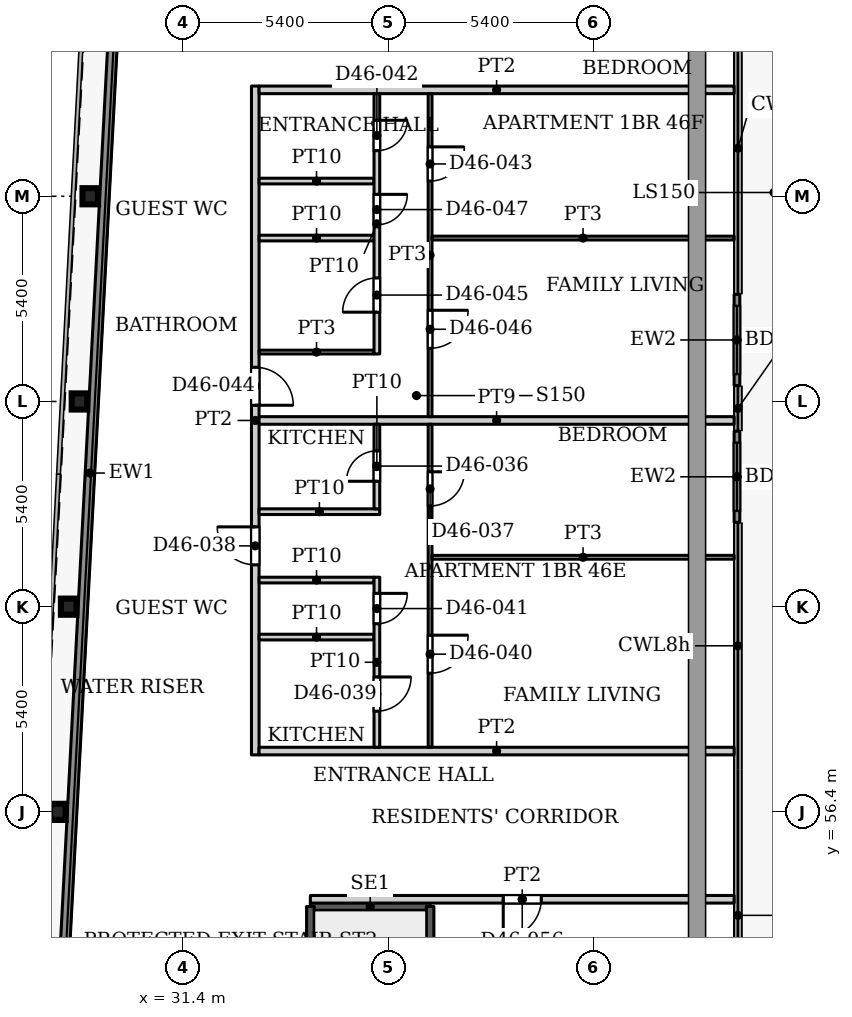
"""IFC4 building model, lengths in metres.
Left out: names, types, materials, properties, quantities, classifications, styles, units other than length and angle.
Written with IfcOpenShell. Run it as: python <this file> out.ifc"""

import sys

from ifc_helpers import new_model, si_unit, direction, frame, frame_2d, origin, origin_2d, place, context, subcontext, project, spatial, rectangle, i_section, extrude, source, transform, mapped, element, fill, save


model = new_model("IFC4")
c1 = context("Model", 3, precision=1e-05, world=origin(), true_north=direction((0.0, 1.0)))
c2 = subcontext(c1, "Body", "Model", "MODEL_VIEW")
j1 = project(units=[si_unit("LENGTHUNIT", "METRE"), si_unit("PLANEANGLEUNIT", "RADIAN")], contexts=[c1])
p1 = place(None, origin())
s1 = spatial("IfcSite", under=j1, at=p1, CompositionType="ELEMENT")
p2 = place(p1, origin())
s2 = spatial("IfcBuilding", under=s1, at=p2, CompositionType="ELEMENT")
p3 = place(p2, frame((0.0, 0.0, 195.5)))
s3 = spatial("IfcBuildingStorey", under=s2, at=p3, CompositionType="ELEMENT", Elevation=195.5)
for number, where, z_axis, x_axis in (
    (1, (28.106, 56.4, 0.0), (0.0, 0.0, 1.0), (1.0, 0.0, 0.0)),
    (2, (28.39, 61.8, 0.0), (0.0, 0.0, 1.0), (1.0, 0.0, 0.0)),
    (3, (28.674, 67.2, 0.0), (0.0, 0.0, 1.0), (1.0, 0.0, 0.0)),
    (4, (28.958, 72.6, 0.0), (0.0, 0.0, 1.0), (1.0, 0.0, 0.0)),
):
    element("IfcColumn", number, at=place(p3, frame(where, z_axis=z_axis, x_axis=x_axis)), inside=s3, PredefinedType="COLUMN", context=c2, shape_type="SweptSolid", body=[
        extrude(i_section(OverallWidth=0.409, OverallDepth=0.425, WebThickness=0.033, FlangeThickness=0.052, FilletRadius=0.013, at=origin_2d()), origin(), (0.0, 0.0, 1.0), 3.9),
    ])
p4 = place(p3, frame((27.195, 31.969, 0.0), z_axis=(0.0, 0.0, 1.0), x_axis=(0.052554995867, 0.998618031286, 0.0)))
e5 = element("IfcWall", 5, at=p4, inside=s3, PredefinedType="SOLIDWALL", context=c2, shape_type="SweptSolid", body=[
    extrude(rectangle(XDim=66.787, YDim=0.25, at=frame_2d((33.394, 0.0))), origin(), (0.0, 0.0, 1.0), 3.75),
])
p5 = place(p3, frame((45.975, 70.018, 0.0), z_axis=(0.0, 0.0, 1.0), x_axis=(0.0, -1.0, 0.0)))
e6 = element("IfcWall", 6, at=p5, inside=s3, PredefinedType="SOLIDWALL", context=c2, shape_type="SweptSolid", body=[
    extrude(rectangle(XDim=2.4, YDim=0.15, at=frame_2d((1.2, 0.0))), origin(), (0.0, 0.0, 1.0), 3.75),
])
p6 = place(p5, frame((0.3, 0.0, 0.0)))
e7 = element("IfcOpeningElement", 7, at=p6, cuts=e6, PredefinedType="OPENING", context=c2, shape_type="SweptSolid", body=[
    extrude(rectangle(XDim=1.8, YDim=2.4, at=frame_2d((0.9, 1.2))), frame((0.0, 0.085, 0.0), z_axis=(0.0, -1.0, 0.0), x_axis=(1.0, 0.0, 0.0)), (0.0, 0.0, 1.0), 0.17),
])
p7 = place(p3, frame((45.975, 66.418, 0.0), z_axis=(0.0, 0.0, 1.0), x_axis=(0.0, -1.0, 0.0)))
e8 = element("IfcWall", 8, at=p7, inside=s3, PredefinedType="SOLIDWALL", context=c2, shape_type="SweptSolid", body=[
    extrude(rectangle(XDim=2.4, YDim=0.15, at=frame_2d((1.2, 0.0))), origin(), (0.0, 0.0, 1.0), 3.75),
])
p8 = place(p7, frame((0.3, 0.0, 0.0)))
e9 = element("IfcOpeningElement", 9, at=p8, cuts=e8, PredefinedType="OPENING", context=c2, shape_type="SweptSolid", body=[
    extrude(rectangle(XDim=1.8, YDim=2.4, at=frame_2d((0.9, 1.2))), frame((0.0, 0.085, 0.0), z_axis=(0.0, -1.0, 0.0), x_axis=(1.0, 0.0, 0.0)), (0.0, 0.0, 1.0), 0.17),
])
p9 = place(p3, frame((34.75, 53.91, 0.0), z_axis=(0.0, 0.0, 1.0), x_axis=(1.0, 0.0, 0.0)))
e10 = element("IfcWall", 10, at=p9, inside=s3, PredefinedType="SHEAR", context=c2, shape_type="SweptSolid", body=[
    extrude(rectangle(XDim=3.15, YDim=0.2, at=frame_2d((1.575, 0.0))), origin(), (0.0, 0.0, 1.0), 3.9),
])
p10 = place(p3, frame((34.75, 47.5, 0.0), z_axis=(0.0, 0.0, 1.0), x_axis=(0.0, 1.0, 0.0)))
e11 = element("IfcWall", 11, at=p10, inside=s3, PredefinedType="SHEAR", context=c2, shape_type="SweptSolid", body=[
    extrude(rectangle(XDim=6.41, YDim=0.2, at=frame_2d((3.205, 0.0))), origin(), (0.0, 0.0, 1.0), 3.9),
])
p11 = place(p3, frame((37.9, 44.75, 0.0), z_axis=(0.0, 0.0, 1.0), x_axis=(0.0, 1.0, 0.0)))
e12 = element("IfcWall", 12, at=p11, inside=s3, PredefinedType="SHEAR", context=c2, shape_type="SweptSolid", body=[
    extrude(rectangle(XDim=9.16, YDim=0.2, at=frame_2d((4.58, 0.0))), origin(), (0.0, 0.0, 1.0), 3.9),
])
p12 = place(p3, frame((33.3, 57.9, 0.0), z_axis=(0.0, 0.0, 1.0), x_axis=(0.0, 1.0, 0.0)))
e13 = element("IfcWall", 13, at=p12, inside=s3, PredefinedType="PARTITIONING", context=c2, shape_type="SweptSolid", body=[
    extrude(rectangle(XDim=17.6, YDim=0.2, at=frame_2d((8.8, 0.0))), origin(), (0.0, 0.0, 1.0), 3.6),
])
p13 = place(p12, frame((5.0, 0.0, 0.0)))
e14 = element("IfcOpeningElement", 14, at=p13, cuts=e13, PredefinedType="OPENING", context=c2, shape_type="SweptSolid", body=[
    extrude(rectangle(XDim=1.0, YDim=2.1, at=frame_2d((0.5, 1.05))), frame((0.0, 0.11, 0.0), z_axis=(0.0, -1.0, 0.0), x_axis=(1.0, 0.0, 0.0)), (0.0, 0.0, 1.0), 0.22),
])
p14 = place(p12, frame((9.2, 0.0, 0.0)))
e15 = element("IfcOpeningElement", 15, at=p14, cuts=e13, PredefinedType="OPENING", context=c2, shape_type="SweptSolid", body=[
    extrude(rectangle(XDim=1.0, YDim=2.1, at=frame_2d((0.5, 1.05))), frame((0.0, 0.11, 0.0), z_axis=(0.0, -1.0, 0.0), x_axis=(1.0, 0.0, 0.0)), (0.0, 0.0, 1.0), 0.22),
])
p15 = place(p3, frame((33.4, 58.0, 0.0), z_axis=(0.0, 0.0, 1.0), x_axis=(1.0, 0.0, 0.0)))
e16 = element("IfcWall", 16, at=p15, inside=s3, PredefinedType="PARTITIONING", context=c2, shape_type="SweptSolid", body=[
    extrude(rectangle(XDim=12.5, YDim=0.2, at=frame_2d((6.25, 0.0))), origin(), (0.0, 0.0, 1.0), 3.6),
])
for number, where, z_axis, x_axis in (
    (17, (33.4, 61.0, 0.0), (0.0, 0.0, 1.0), (1.0, 0.0, 0.0)),
    (18, (33.4, 62.5, 0.0), (0.0, 0.0, 1.0), (1.0, 0.0, 0.0)),
):
    element("IfcWall", number, at=place(p3, frame(where, z_axis=z_axis, x_axis=x_axis)), inside=s3, PredefinedType="PARTITIONING", context=c2, shape_type="SweptSolid", body=[
        extrude(rectangle(XDim=3.025, YDim=0.15, at=frame_2d((1.513, 0.0))), origin(), (0.0, 0.0, 1.0), 3.6),
    ])
p16 = place(p3, frame((33.4, 64.3, 0.0), z_axis=(0.0, 0.0, 1.0), x_axis=(1.0, 0.0, 0.0)))
e19 = element("IfcWall", 19, at=p16, inside=s3, PredefinedType="PARTITIONING", context=c2, shape_type="SweptSolid", body=[
    extrude(rectangle(XDim=3.175, YDim=0.15, at=frame_2d((1.587, 0.0))), origin(), (0.0, 0.0, 1.0), 3.6),
])
p17 = place(p3, frame((33.4, 66.7, 0.0), z_axis=(0.0, 0.0, 1.0), x_axis=(1.0, 0.0, 0.0)))
e20 = element("IfcWall", 20, at=p17, inside=s3, PredefinedType="PARTITIONING", context=c2, shape_type="SweptSolid", body=[
    extrude(rectangle(XDim=12.5, YDim=0.2, at=frame_2d((6.25, 0.0))), origin(), (0.0, 0.0, 1.0), 3.6),
])
p18 = place(p3, frame((33.4, 68.5, 0.0), z_axis=(0.0, 0.0, 1.0), x_axis=(1.0, 0.0, 0.0)))
e21 = element("IfcWall", 21, at=p18, inside=s3, PredefinedType="PARTITIONING", context=c2, shape_type="SweptSolid", body=[
    extrude(rectangle(XDim=3.025, YDim=0.1, at=frame_2d((1.513, 0.0))), origin(), (0.0, 0.0, 1.0), 3.6),
])
for number, where, z_axis, x_axis in (
    (22, (33.4, 71.5, 0.0), (0.0, 0.0, 1.0), (1.0, 0.0, 0.0)),
    (23, (33.4, 73.0, 0.0), (0.0, 0.0, 1.0), (1.0, 0.0, 0.0)),
):
    element("IfcWall", number, at=place(p3, frame(where, z_axis=z_axis, x_axis=x_axis)), inside=s3, PredefinedType="PARTITIONING", context=c2, shape_type="SweptSolid", body=[
        extrude(rectangle(XDim=3.025, YDim=0.15, at=frame_2d((1.513, 0.0))), origin(), (0.0, 0.0, 1.0), 3.6),
    ])
p19 = place(p3, frame((33.4, 75.4, 0.0), z_axis=(0.0, 0.0, 1.0), x_axis=(1.0, 0.0, 0.0)))
e24 = element("IfcWall", 24, at=p19, inside=s3, PredefinedType="PARTITIONING", context=c2, shape_type="SweptSolid", body=[
    extrude(rectangle(XDim=12.5, YDim=0.2, at=frame_2d((6.25, 0.0))), origin(), (0.0, 0.0, 1.0), 3.6),
])
p20 = place(p3, frame((34.75, 54.1, 0.0), z_axis=(0.0, 0.0, 1.0), x_axis=(1.0, 0.0, 0.0)))
e25 = element("IfcWall", 25, at=p20, inside=s3, PredefinedType="PARTITIONING", context=c2, shape_type="SweptSolid", body=[
    extrude(rectangle(XDim=11.15, YDim=0.2, at=frame_2d((5.575, 0.0))), origin(), (0.0, 0.0, 1.0), 3.6),
])
p21 = place(p20, frame((5.075, 0.0, 0.0)))
e26 = element("IfcOpeningElement", 26, at=p21, cuts=e25, PredefinedType="OPENING", context=c2, shape_type="SweptSolid", body=[
    extrude(rectangle(XDim=1.0, YDim=2.1, at=frame_2d((0.5, 1.05))), frame((0.0, 0.11, 0.0), z_axis=(0.0, -1.0, 0.0), x_axis=(1.0, 0.0, 0.0)), (0.0, 0.0, 1.0), 0.22),
])
p22 = place(p3, frame((36.5, 58.1, 0.0), z_axis=(0.0, 0.0, 1.0), x_axis=(0.0, 1.0, 0.0)))
e27 = element("IfcWall", 27, at=p22, inside=s3, PredefinedType="PARTITIONING", context=c2, shape_type="SweptSolid", body=[
    extrude(rectangle(XDim=4.475, YDim=0.15, at=frame_2d((2.237, 0.0))), origin(), (0.0, 0.0, 1.0), 3.6),
])
p23 = place(p22, frame((0.95, 0.0, 0.0)))
e28 = element("IfcOpeningElement", 28, at=p23, cuts=e27, PredefinedType="OPENING", context=c2, shape_type="SweptSolid", body=[
    extrude(rectangle(XDim=0.9, YDim=2.1, at=frame_2d((0.45, 1.05))), frame((0.0, 0.085, 0.0), z_axis=(0.0, -1.0, 0.0), x_axis=(1.0, 0.0, 0.0)), (0.0, 0.0, 1.0), 0.17),
])
p24 = place(p22, frame((3.25, 0.0, 0.0)))
e29 = element("IfcOpeningElement", 29, at=p24, cuts=e27, PredefinedType="OPENING", context=c2, shape_type="SweptSolid", body=[
    extrude(rectangle(XDim=0.8, YDim=2.1, at=frame_2d((0.4, 1.05))), frame((0.0, 0.085, 0.0), z_axis=(0.0, -1.0, 0.0), x_axis=(1.0, 0.0, 0.0)), (0.0, 0.0, 1.0), 0.17),
])
p25 = place(p3, frame((36.5, 64.375, 0.0), z_axis=(0.0, 0.0, 1.0), x_axis=(0.0, 1.0, 0.0)))
e30 = element("IfcWall", 30, at=p25, inside=s3, PredefinedType="PARTITIONING", context=c2, shape_type="SweptSolid", body=[
    extrude(rectangle(XDim=2.225, YDim=0.15, at=frame_2d((1.113, 0.0))), origin(), (0.0, 0.0, 1.0), 3.6),
])
p26 = place(p25, frame((0.725, 0.0, 0.0)))
e31 = element("IfcOpeningElement", 31, at=p26, cuts=e30, PredefinedType="OPENING", context=c2, shape_type="SweptSolid", body=[
    extrude(rectangle(XDim=0.8, YDim=2.1, at=frame_2d((0.4, 1.05))), frame((0.0, 0.085, 0.0), z_axis=(0.0, -1.0, 0.0), x_axis=(1.0, 0.0, 0.0)), (0.0, 0.0, 1.0), 0.17),
])
p27 = place(p3, frame((36.5, 68.45, 0.0), z_axis=(0.0, 0.0, 1.0), x_axis=(0.0, 1.0, 0.0)))
e32 = element("IfcWall", 32, at=p27, inside=s3, PredefinedType="PARTITIONING", context=c2, shape_type="SweptSolid", body=[
    extrude(rectangle(XDim=6.85, YDim=0.15, at=frame_2d((3.425, 0.0))), origin(), (0.0, 0.0, 1.0), 3.6),
])
p28 = place(p27, frame((5.35, 0.0, 0.0)))
e33 = element("IfcOpeningElement", 33, at=p28, cuts=e32, PredefinedType="OPENING", context=c2, shape_type="SweptSolid", body=[
    extrude(rectangle(XDim=0.8, YDim=2.1, at=frame_2d((0.4, 1.05))), frame((0.0, 0.085, 0.0), z_axis=(0.0, -1.0, 0.0), x_axis=(1.0, 0.0, 0.0)), (0.0, 0.0, 1.0), 0.17),
])
p29 = place(p27, frame((1.1, 0.0, 0.0)))
e34 = element("IfcOpeningElement", 34, at=p29, cuts=e32, PredefinedType="OPENING", context=c2, shape_type="SweptSolid", body=[
    extrude(rectangle(XDim=0.9, YDim=2.1, at=frame_2d((0.45, 1.05))), frame((0.0, 0.085, 0.0), z_axis=(0.0, -1.0, 0.0), x_axis=(1.0, 0.0, 0.0)), (0.0, 0.0, 1.0), 0.17),
])
p30 = place(p27, frame((3.4, 0.0, 0.0)))
e35 = element("IfcOpeningElement", 35, at=p30, cuts=e32, PredefinedType="OPENING", context=c2, shape_type="SweptSolid", body=[
    extrude(rectangle(XDim=0.8, YDim=2.1, at=frame_2d((0.4, 1.05))), frame((0.0, 0.085, 0.0), z_axis=(0.0, -1.0, 0.0), x_axis=(1.0, 0.0, 0.0)), (0.0, 0.0, 1.0), 0.17),
])
p31 = place(p3, frame((37.9, 58.1, 0.0), z_axis=(0.0, 0.0, 1.0), x_axis=(0.0, 1.0, 0.0)))
e36 = element("IfcWall", 36, at=p31, inside=s3, PredefinedType="PARTITIONING", context=c2, shape_type="SweptSolid", body=[
    extrude(rectangle(XDim=8.5, YDim=0.1, at=frame_2d((4.25, 0.0))), origin(), (0.0, 0.0, 1.0), 3.6),
])
p32 = place(p31, frame((6.35, 0.0, 0.0)))
e37 = element("IfcOpeningElement", 37, at=p32, cuts=e36, PredefinedType="OPENING", context=c2, shape_type="SweptSolid", body=[
    extrude(rectangle(XDim=0.9, YDim=2.1, at=frame_2d((0.45, 1.05))), frame((0.0, 0.06, 0.0), z_axis=(0.0, -1.0, 0.0), x_axis=(1.0, 0.0, 0.0)), (0.0, 0.0, 1.0), 0.12),
])
p33 = place(p31, frame((1.95, 0.0, 0.0)))
e38 = element("IfcOpeningElement", 38, at=p33, cuts=e36, PredefinedType="OPENING", context=c2, shape_type="SweptSolid", body=[
    extrude(rectangle(XDim=1.0, YDim=2.1, at=frame_2d((0.5, 1.05))), frame((0.0, 0.06, 0.0), z_axis=(0.0, -1.0, 0.0), x_axis=(1.0, 0.0, 0.0)), (0.0, 0.0, 1.0), 0.12),
])
p34 = place(p3, frame((37.9, 66.8, 0.0), z_axis=(0.0, 0.0, 1.0), x_axis=(0.0, 1.0, 0.0)))
e39 = element("IfcWall", 39, at=p34, inside=s3, PredefinedType="PARTITIONING", context=c2, shape_type="SweptSolid", body=[
    extrude(rectangle(XDim=8.5, YDim=0.1, at=frame_2d((4.25, 0.0))), origin(), (0.0, 0.0, 1.0), 3.6),
])
p35 = place(p34, frame((6.2, 0.0, 0.0)))
e40 = element("IfcOpeningElement", 40, at=p35, cuts=e39, PredefinedType="OPENING", context=c2, shape_type="SweptSolid", body=[
    extrude(rectangle(XDim=0.9, YDim=2.1, at=frame_2d((0.45, 1.05))), frame((0.0, 0.06, 0.0), z_axis=(0.0, -1.0, 0.0), x_axis=(1.0, 0.0, 0.0)), (0.0, 0.0, 1.0), 0.12),
])
p36 = place(p34, frame((1.8, 0.0, 0.0)))
e41 = element("IfcOpeningElement", 41, at=p36, cuts=e39, PredefinedType="OPENING", context=c2, shape_type="SweptSolid", body=[
    extrude(rectangle(XDim=1.0, YDim=2.1, at=frame_2d((0.5, 1.05))), frame((0.0, 0.06, 0.0), z_axis=(0.0, -1.0, 0.0), x_axis=(1.0, 0.0, 0.0)), (0.0, 0.0, 1.0), 0.12),
])
for number, where, z_axis, x_axis in (
    (42, (37.95, 63.1, 0.0), (0.0, 0.0, 1.0), (1.0, 0.0, 0.0)),
    (43, (37.95, 71.5, 0.0), (0.0, 0.0, 1.0), (1.0, 0.0, 0.0)),
):
    element("IfcWall", number, at=place(p3, frame(where, z_axis=z_axis, x_axis=x_axis)), inside=s3, PredefinedType="PARTITIONING", context=c2, shape_type="SweptSolid", body=[
        extrude(rectangle(XDim=7.95, YDim=0.1, at=frame_2d((3.975, 0.0))), origin(), (0.0, 0.0, 1.0), 3.6),
    ])
m1 = source(origin(), c2, "Body", "SweptSolid", [
    extrude(rectangle(XDim=1.8, YDim=2.4, at=frame_2d((0.9, 1.2))), frame((0.0, 0.025, 0.0), z_axis=(0.0, -1.0, 0.0), x_axis=(1.0, 0.0, 0.0)), (0.0, 0.0, 1.0), 0.05),
])
p37 = place(p6, origin())
e44 = element("IfcDoor", 44, at=p37, inside=s3, OperationType="SLIDING_TO_LEFT", PredefinedType="DOOR", context=c2, shape_type="MappedRepresentation", body=[
    mapped(m1, transform((0.0, 0.0, 0.0), x_axis=(1.0, 0.0, 0.0), y_axis=(0.0, 1.0, 0.0), z_axis=(0.0, 0.0, 1.0), scale=1.0)),
])
fill(e7, e44)
p38 = place(p8, origin())
e45 = element("IfcDoor", 45, at=p38, inside=s3, OperationType="SLIDING_TO_LEFT", PredefinedType="DOOR", context=c2, shape_type="MappedRepresentation", body=[
    mapped(m1, transform((0.0, 0.0, 0.0), x_axis=(1.0, 0.0, 0.0), y_axis=(0.0, 1.0, 0.0), z_axis=(0.0, 0.0, 1.0), scale=1.0)),
])
fill(e9, e45)
m2 = source(origin(), c2, "Body", "SweptSolid", [
    extrude(rectangle(XDim=0.8, YDim=2.1, at=frame_2d((0.4, 1.05))), frame((0.0, 0.025, 0.0), z_axis=(0.0, -1.0, 0.0), x_axis=(1.0, 0.0, 0.0)), (0.0, 0.0, 1.0), 0.05),
])
p39 = place(p26, origin())
e46 = element("IfcDoor", 46, at=p39, inside=s3, OperationType="SINGLE_SWING_LEFT", PredefinedType="DOOR", context=c2, shape_type="MappedRepresentation", body=[
    mapped(m2, transform((0.0, 0.0, 0.0), x_axis=(1.0, 0.0, 0.0), y_axis=(0.0, 1.0, 0.0), z_axis=(0.0, 0.0, 1.0), scale=1.0)),
])
fill(e31, e46)
m3 = source(origin(), c2, "Body", "SweptSolid", [
    extrude(rectangle(XDim=0.9, YDim=2.1, at=frame_2d((0.45, 1.05))), frame((0.0, 0.025, 0.0), z_axis=(0.0, -1.0, 0.0), x_axis=(1.0, 0.0, 0.0)), (0.0, 0.0, 1.0), 0.05),
])
p40 = place(p32, origin())
e47 = element("IfcDoor", 47, at=p40, inside=s3, OperationType="SINGLE_SWING_RIGHT", PredefinedType="DOOR", context=c2, shape_type="MappedRepresentation", body=[
    mapped(m3, transform((0.0, 0.0, 0.0), x_axis=(1.0, 0.0, 0.0), y_axis=(0.0, 1.0, 0.0), z_axis=(0.0, 0.0, 1.0), scale=1.0)),
])
fill(e37, e47)
m4 = source(origin(), c2, "Body", "SweptSolid", [
    extrude(rectangle(XDim=1.0, YDim=2.1, at=frame_2d((0.5, 1.05))), frame((0.0, 0.025, 0.0), z_axis=(0.0, -1.0, 0.0), x_axis=(1.0, 0.0, 0.0)), (0.0, 0.0, 1.0), 0.05),
])
p41 = place(p13, origin())
e48 = element("IfcDoor", 48, at=p41, inside=s3, OperationType="SINGLE_SWING_LEFT", PredefinedType="DOOR", context=c2, shape_type="MappedRepresentation", body=[
    mapped(m4, transform((0.0, 0.0, 0.0), x_axis=(1.0, 0.0, 0.0), y_axis=(0.0, 1.0, 0.0), z_axis=(0.0, 0.0, 1.0), scale=1.0)),
])
fill(e14, e48)
p42 = place(p23, origin())
e49 = element("IfcDoor", 49, at=p42, inside=s3, OperationType="SINGLE_SWING_RIGHT", PredefinedType="DOOR", context=c2, shape_type="MappedRepresentation", body=[
    mapped(m3, transform((0.0, 0.0, 0.0), x_axis=(1.0, 0.0, 0.0), y_axis=(0.0, 1.0, 0.0), z_axis=(0.0, 0.0, 1.0), scale=1.0)),
])
fill(e28, e49)
m5 = source(origin(), c2, "Body", "SweptSolid", [
    extrude(rectangle(XDim=1.0, YDim=2.1, at=frame_2d((0.5, 1.05))), frame((0.0, 0.025, 0.0), z_axis=(0.0, -1.0, 0.0), x_axis=(1.0, 0.0, 0.0)), (0.0, 0.0, 1.0), 0.05),
])
p43 = place(p33, origin())
e50 = element("IfcDoor", 50, at=p43, inside=s3, OperationType="SINGLE_SWING_RIGHT", PredefinedType="DOOR", context=c2, shape_type="MappedRepresentation", body=[
    mapped(m5, transform((0.0, 0.0, 0.0), x_axis=(1.0, 0.0, 0.0), y_axis=(0.0, 1.0, 0.0), z_axis=(0.0, 0.0, 1.0), scale=1.0)),
])
fill(e38, e50)
p44 = place(p24, origin())
e51 = element("IfcDoor", 51, at=p44, inside=s3, OperationType="SINGLE_SWING_RIGHT", PredefinedType="DOOR", context=c2, shape_type="MappedRepresentation", body=[
    mapped(m2, transform((0.0, 0.0, 0.0), x_axis=(1.0, 0.0, 0.0), y_axis=(0.0, 1.0, 0.0), z_axis=(0.0, 0.0, 1.0), scale=1.0)),
])
fill(e29, e51)
p45 = place(p28, origin())
e52 = element("IfcDoor", 52, at=p45, inside=s3, OperationType="SINGLE_SWING_RIGHT", PredefinedType="DOOR", context=c2, shape_type="MappedRepresentation", body=[
    mapped(m2, transform((0.0, 0.0, 0.0), x_axis=(1.0, 0.0, 0.0), y_axis=(0.0, 1.0, 0.0), z_axis=(0.0, 0.0, 1.0), scale=1.0)),
])
fill(e33, e52)
p46 = place(p35, origin())
e53 = element("IfcDoor", 53, at=p46, inside=s3, OperationType="SINGLE_SWING_RIGHT", PredefinedType="DOOR", context=c2, shape_type="MappedRepresentation", body=[
    mapped(m3, transform((0.0, 0.0, 0.0), x_axis=(1.0, 0.0, 0.0), y_axis=(0.0, 1.0, 0.0), z_axis=(0.0, 0.0, 1.0), scale=1.0)),
])
fill(e40, e53)
p47 = place(p14, origin())
e54 = element("IfcDoor", 54, at=p47, inside=s3, OperationType="SINGLE_SWING_RIGHT", PredefinedType="DOOR", context=c2, shape_type="MappedRepresentation", body=[
    mapped(m4, transform((0.0, 0.0, 0.0), x_axis=(1.0, 0.0, 0.0), y_axis=(0.0, 1.0, 0.0), z_axis=(0.0, 0.0, 1.0), scale=1.0)),
])
fill(e15, e54)
p48 = place(p29, origin())
e55 = element("IfcDoor", 55, at=p48, inside=s3, OperationType="SINGLE_SWING_LEFT", PredefinedType="DOOR", context=c2, shape_type="MappedRepresentation", body=[
    mapped(m3, transform((0.0, 0.0, 0.0), x_axis=(1.0, 0.0, 0.0), y_axis=(0.0, 1.0, 0.0), z_axis=(0.0, 0.0, 1.0), scale=1.0)),
])
fill(e34, e55)
p49 = place(p36, origin())
e56 = element("IfcDoor", 56, at=p49, inside=s3, OperationType="SINGLE_SWING_RIGHT", PredefinedType="DOOR", context=c2, shape_type="MappedRepresentation", body=[
    mapped(m5, transform((0.0, 0.0, 0.0), x_axis=(1.0, 0.0, 0.0), y_axis=(0.0, 1.0, 0.0), z_axis=(0.0, 0.0, 1.0), scale=1.0)),
])
fill(e41, e56)
p50 = place(p30, origin())
e57 = element("IfcDoor", 57, at=p50, inside=s3, OperationType="SINGLE_SWING_RIGHT", PredefinedType="DOOR", context=c2, shape_type="MappedRepresentation", body=[
    mapped(m2, transform((0.0, 0.0, 0.0), x_axis=(1.0, 0.0, 0.0), y_axis=(0.0, 1.0, 0.0), z_axis=(0.0, 0.0, 1.0), scale=1.0)),
])
fill(e35, e57)
m6 = source(origin(), c2, "Body", "SweptSolid", [
    extrude(rectangle(XDim=1.0, YDim=2.1, at=frame_2d((0.5, 1.05))), frame((0.0, 0.025, 0.0), z_axis=(0.0, -1.0, 0.0), x_axis=(1.0, 0.0, 0.0)), (0.0, 0.0, 1.0), 0.05),
])
p51 = place(p21, origin())
e58 = element("IfcDoor", 58, at=p51, inside=s3, OperationType="SINGLE_SWING_RIGHT", PredefinedType="DOOR", context=c2, shape_type="MappedRepresentation", body=[
    mapped(m6, transform((0.0, 0.0, 0.0), x_axis=(1.0, 0.0, 0.0), y_axis=(0.0, 1.0, 0.0), z_axis=(0.0, 0.0, 1.0), scale=1.0)),
])
fill(e26, e58)
save(model, sys.argv[1])
